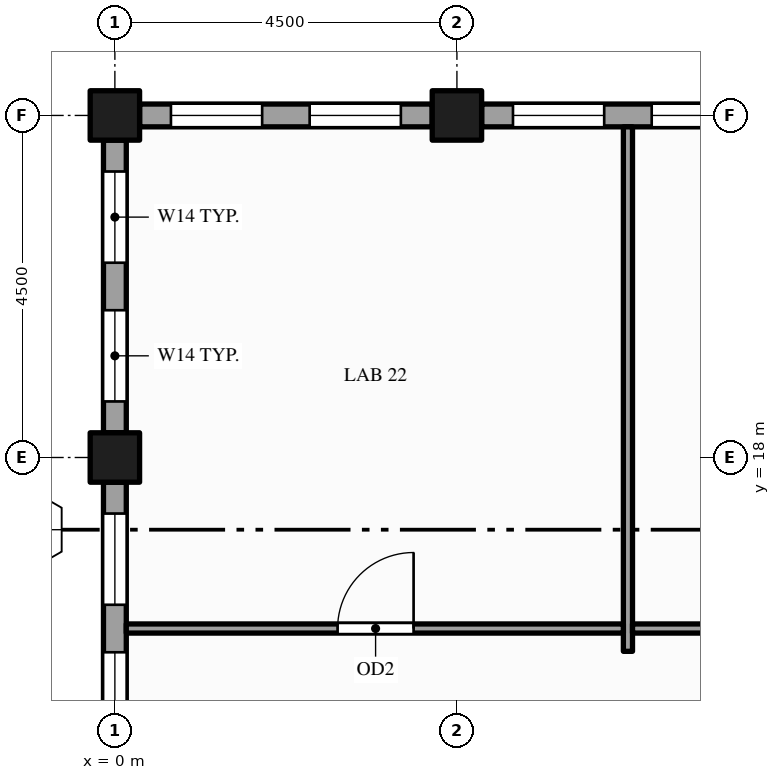
"""IFC4 building model, lengths in metres.
Left out: names, types, materials, properties, quantities, classifications, styles, units other than length and angle.
Written with IfcOpenShell. Run it as: python <this file> out.ifc"""

import sys

from ifc_helpers import new_model, si_unit, direction, frame, frame_2d, origin, origin_2d, place, context, subcontext, project, spatial, rectangle, hollow_rectangle, extrude, element, fill, save


model = new_model("IFC4")
c1 = context("Model", 3, precision=1e-05, world=origin(), true_north=direction((0.0, 1.0)))
c2 = subcontext(c1, "Body", "Model", "MODEL_VIEW")
j1 = project(units=[si_unit("LENGTHUNIT", "METRE"), si_unit("PLANEANGLEUNIT", "RADIAN")], contexts=[c1])
p1 = place(None, origin())
s1 = spatial("IfcSite", under=j1, at=p1, CompositionType="ELEMENT")
p2 = place(p1, origin())
s2 = spatial("IfcBuilding", under=s1, at=p2, CompositionType="ELEMENT")
p3 = place(p2, frame((0.0, 0.0, 285.0)))
s3 = spatial("IfcBuildingStorey", under=s2, at=p3, CompositionType="ELEMENT", Elevation=285.0)
for number, where, z_axis, x_axis in (
    (1, (0.0, 18.0, -0.15), (0.0, 0.0, 1.0), (1.0, 0.0, 0.0)),
    (2, (0.0, 22.5, -0.15), (0.0, 0.0, 1.0), (1.0, 0.0, 0.0)),
    (3, (4.5, 22.5, -0.15), (0.0, 0.0, 1.0), (1.0, 0.0, 0.0)),
):
    element("IfcColumn", number, at=place(p3, frame(where, z_axis=z_axis, x_axis=x_axis)), inside=s3, PredefinedType="COLUMN", context=c2, shape_type="SweptSolid", body=[
        extrude(hollow_rectangle(XDim=0.65, YDim=0.65, WallThickness=0.032, at=origin_2d()), origin(), (0.0, 0.0, 1.0), 4.0),
    ])
p4 = place(p3, frame((8.675, 22.5, 0.0), z_axis=(0.0, 0.0, 1.0), x_axis=(-1.0, 0.0, 0.0)))
e4 = element("IfcWall", 4, at=p4, inside=s3, PredefinedType="STANDARD", context=c2, shape_type="SweptSolid", body=[
    extrude(rectangle(XDim=3.85, YDim=0.3, at=frame_2d((1.925, 0.0))), origin(), (0.0, 0.0, 1.0), 2.87),
])
p5 = place(p4, frame((0.413, 0.0, 0.9)))
e5 = element("IfcOpeningElement", 5, at=p5, cuts=e4, PredefinedType="OPENING", context=c2, shape_type="SweptSolid", body=[
    extrude(rectangle(XDim=1.2, YDim=1.75, at=frame_2d((0.6, 0.875))), frame((0.0, 0.16, 0.0), z_axis=(0.0, -1.0, 0.0), x_axis=(1.0, 0.0, 0.0)), (0.0, 0.0, 1.0), 0.32),
])
p6 = place(p4, frame((2.238, 0.0, 0.9)))
e6 = element("IfcOpeningElement", 6, at=p6, cuts=e4, PredefinedType="OPENING", context=c2, shape_type="SweptSolid", body=[
    extrude(rectangle(XDim=1.2, YDim=1.75, at=frame_2d((0.6, 0.875))), frame((0.0, 0.16, 0.0), z_axis=(0.0, -1.0, 0.0), x_axis=(1.0, 0.0, 0.0)), (0.0, 0.0, 1.0), 0.32),
])
p7 = place(p3, frame((4.175, 22.5, 0.0), z_axis=(0.0, 0.0, 1.0), x_axis=(-1.0, 0.0, 0.0)))
e7 = element("IfcWall", 7, at=p7, inside=s3, PredefinedType="STANDARD", context=c2, shape_type="SweptSolid", body=[
    extrude(rectangle(XDim=3.85, YDim=0.3, at=frame_2d((1.925, 0.0))), origin(), (0.0, 0.0, 1.0), 2.87),
])
p8 = place(p7, frame((0.413, 0.0, 0.9)))
e8 = element("IfcOpeningElement", 8, at=p8, cuts=e7, PredefinedType="OPENING", context=c2, shape_type="SweptSolid", body=[
    extrude(rectangle(XDim=1.2, YDim=1.75, at=frame_2d((0.6, 0.875))), frame((0.0, 0.16, 0.0), z_axis=(0.0, -1.0, 0.0), x_axis=(1.0, 0.0, 0.0)), (0.0, 0.0, 1.0), 0.32),
])
p9 = place(p7, frame((2.238, 0.0, 0.9)))
e9 = element("IfcOpeningElement", 9, at=p9, cuts=e7, PredefinedType="OPENING", context=c2, shape_type="SweptSolid", body=[
    extrude(rectangle(XDim=1.2, YDim=1.75, at=frame_2d((0.6, 0.875))), frame((0.0, 0.16, 0.0), z_axis=(0.0, -1.0, 0.0), x_axis=(1.0, 0.0, 0.0)), (0.0, 0.0, 1.0), 0.32),
])
p10 = place(p3, frame((0.0, 22.175, 0.0), z_axis=(0.0, 0.0, 1.0), x_axis=(0.0, -1.0, 0.0)))
e10 = element("IfcWall", 10, at=p10, inside=s3, PredefinedType="STANDARD", context=c2, shape_type="SweptSolid", body=[
    extrude(rectangle(XDim=3.85, YDim=0.3, at=frame_2d((1.925, 0.0))), origin(), (0.0, 0.0, 1.0), 3.162),
])
p11 = place(p10, frame((0.413, 0.0, 0.9)))
e11 = element("IfcOpeningElement", 11, at=p11, cuts=e10, PredefinedType="OPENING", context=c2, shape_type="SweptSolid", body=[
    extrude(rectangle(XDim=1.2, YDim=2.0, at=frame_2d((0.6, 1.0))), frame((0.0, 0.16, 0.0), z_axis=(0.0, -1.0, 0.0), x_axis=(1.0, 0.0, 0.0)), (0.0, 0.0, 1.0), 0.32),
])
p12 = place(p10, frame((2.238, 0.0, 0.9)))
e12 = element("IfcOpeningElement", 12, at=p12, cuts=e10, PredefinedType="OPENING", context=c2, shape_type="SweptSolid", body=[
    extrude(rectangle(XDim=1.2, YDim=2.0, at=frame_2d((0.6, 1.0))), frame((0.0, 0.16, 0.0), z_axis=(0.0, -1.0, 0.0), x_axis=(1.0, 0.0, 0.0)), (0.0, 0.0, 1.0), 0.32),
])
p13 = place(p3, frame((0.0, 17.675, 0.0), z_axis=(0.0, 0.0, 1.0), x_axis=(0.0, -1.0, 0.0)))
e13 = element("IfcWall", 13, at=p13, inside=s3, PredefinedType="STANDARD", context=c2, shape_type="SweptSolid", body=[
    extrude(rectangle(XDim=3.85, YDim=0.3, at=frame_2d((1.925, 0.0))), origin(), (0.0, 0.0, 1.0), 3.162),
])
p14 = place(p13, frame((0.413, 0.0, 0.9)))
e14 = element("IfcOpeningElement", 14, at=p14, cuts=e13, PredefinedType="OPENING", context=c2, shape_type="SweptSolid", body=[
    extrude(rectangle(XDim=1.2, YDim=2.0, at=frame_2d((0.6, 1.0))), frame((0.0, 0.16, 0.0), z_axis=(0.0, -1.0, 0.0), x_axis=(1.0, 0.0, 0.0)), (0.0, 0.0, 1.0), 0.32),
])
p15 = place(p13, frame((2.238, 0.0, 0.9)))
e15 = element("IfcOpeningElement", 15, at=p15, cuts=e13, PredefinedType="OPENING", context=c2, shape_type="SweptSolid", body=[
    extrude(rectangle(XDim=1.2, YDim=2.0, at=frame_2d((0.6, 1.0))), frame((0.0, 0.16, 0.0), z_axis=(0.0, -1.0, 0.0), x_axis=(1.0, 0.0, 0.0)), (0.0, 0.0, 1.0), 0.32),
])
p16 = place(p3, frame((6.75, 15.45, 0.0), z_axis=(0.0, 0.0, 1.0), x_axis=(0.0, 1.0, 0.0)))
e16 = element("IfcWall", 16, at=p16, inside=s3, PredefinedType="PARTITIONING", context=c2, shape_type="SweptSolid", body=[
    extrude(rectangle(XDim=6.9, YDim=0.12, at=frame_2d((3.45, 0.0))), origin(), (0.0, 0.0, 1.0), 2.87),
])
p17 = place(p3, frame((0.15, 15.75, 0.0), z_axis=(0.0, 0.0, 1.0), x_axis=(1.0, 0.0, 0.0)))
e17 = element("IfcWall", 17, at=p17, inside=s3, PredefinedType="PARTITIONING", context=c2, shape_type="SweptSolid", body=[
    extrude(rectangle(XDim=6.54, YDim=0.12, at=frame_2d((3.27, 0.0))), origin(), (0.0, 0.0, 1.0), 2.87),
])
p18 = place(p17, frame((2.78, 0.0, 0.0)))
e18 = element("IfcOpeningElement", 18, at=p18, cuts=e17, PredefinedType="OPENING", context=c2, shape_type="SweptSolid", body=[
    extrude(rectangle(XDim=1.0, YDim=2.1, at=frame_2d((0.5, 1.05))), frame((0.0, 0.07, 0.0), z_axis=(0.0, -1.0, 0.0), x_axis=(1.0, 0.0, 0.0)), (0.0, 0.0, 1.0), 0.14),
])
p19 = place(p3, frame((6.81, 15.75, 0.0), z_axis=(0.0, 0.0, 1.0), x_axis=(1.0, 0.0, 0.0)))
e19 = element("IfcWall", 19, at=p19, inside=s3, PredefinedType="PARTITIONING", context=c2, shape_type="SweptSolid", body=[
    extrude(rectangle(XDim=6.63, YDim=0.12, at=frame_2d((3.315, 0.0))), origin(), (0.0, 0.0, 1.0), 2.87),
])
p20 = place(p19, frame((2.815, 0.0, 0.0)))
e20 = element("IfcOpeningElement", 20, at=p20, cuts=e19, PredefinedType="OPENING", context=c2, shape_type="SweptSolid", body=[
    extrude(rectangle(XDim=1.0, YDim=2.1, at=frame_2d((0.5, 1.05))), frame((0.0, 0.07, 0.0), z_axis=(0.0, -1.0, 0.0), x_axis=(1.0, 0.0, 0.0)), (0.0, 0.0, 1.0), 0.14),
])
p21 = place(p5, origin())
e21 = element("IfcWindow", 21, at=p21, inside=s3, PartitioningType="SINGLE_PANEL", PredefinedType="WINDOW", context=c2, shape_type="SweptSolid", body=[
    extrude(rectangle(XDim=1.2, YDim=1.75, at=frame_2d((0.6, 0.875))), frame((0.0, 0.03, 0.0), z_axis=(0.0, -1.0, 0.0), x_axis=(1.0, 0.0, 0.0)), (0.0, 0.0, 1.0), 0.06),
])
fill(e5, e21)
p22 = place(p6, origin())
e22 = element("IfcWindow", 22, at=p22, inside=s3, PartitioningType="SINGLE_PANEL", PredefinedType="WINDOW", context=c2, shape_type="SweptSolid", body=[
    extrude(rectangle(XDim=1.2, YDim=1.75, at=frame_2d((0.6, 0.875))), frame((0.0, 0.03, 0.0), z_axis=(0.0, -1.0, 0.0), x_axis=(1.0, 0.0, 0.0)), (0.0, 0.0, 1.0), 0.06),
])
fill(e6, e22)
p23 = place(p8, origin())
e23 = element("IfcWindow", 23, at=p23, inside=s3, PartitioningType="SINGLE_PANEL", PredefinedType="WINDOW", context=c2, shape_type="SweptSolid", body=[
    extrude(rectangle(XDim=1.2, YDim=1.75, at=frame_2d((0.6, 0.875))), frame((0.0, 0.03, 0.0), z_axis=(0.0, -1.0, 0.0), x_axis=(1.0, 0.0, 0.0)), (0.0, 0.0, 1.0), 0.06),
])
fill(e8, e23)
p24 = place(p9, origin())
e24 = element("IfcWindow", 24, at=p24, inside=s3, PartitioningType="SINGLE_PANEL", PredefinedType="WINDOW", context=c2, shape_type="SweptSolid", body=[
    extrude(rectangle(XDim=1.2, YDim=1.75, at=frame_2d((0.6, 0.875))), frame((0.0, 0.03, 0.0), z_axis=(0.0, -1.0, 0.0), x_axis=(1.0, 0.0, 0.0)), (0.0, 0.0, 1.0), 0.06),
])
fill(e9, e24)
p25 = place(p11, origin())
e25 = element("IfcWindow", 25, at=p25, inside=s3, PartitioningType="SINGLE_PANEL", PredefinedType="WINDOW", context=c2, shape_type="SweptSolid", body=[
    extrude(rectangle(XDim=1.2, YDim=2.0, at=frame_2d((0.6, 1.0))), frame((0.0, 0.03, 0.0), z_axis=(0.0, -1.0, 0.0), x_axis=(1.0, 0.0, 0.0)), (0.0, 0.0, 1.0), 0.06),
])
fill(e11, e25)
p26 = place(p12, origin())
e26 = element("IfcWindow", 26, at=p26, inside=s3, PartitioningType="SINGLE_PANEL", PredefinedType="WINDOW", context=c2, shape_type="SweptSolid", body=[
    extrude(rectangle(XDim=1.2, YDim=2.0, at=frame_2d((0.6, 1.0))), frame((0.0, 0.03, 0.0), z_axis=(0.0, -1.0, 0.0), x_axis=(1.0, 0.0, 0.0)), (0.0, 0.0, 1.0), 0.06),
])
fill(e12, e26)
p27 = place(p14, origin())
e27 = element("IfcWindow", 27, at=p27, inside=s3, PartitioningType="SINGLE_PANEL", PredefinedType="WINDOW", context=c2, shape_type="SweptSolid", body=[
    extrude(rectangle(XDim=1.2, YDim=2.0, at=frame_2d((0.6, 1.0))), frame((0.0, 0.03, 0.0), z_axis=(0.0, -1.0, 0.0), x_axis=(1.0, 0.0, 0.0)), (0.0, 0.0, 1.0), 0.06),
])
fill(e14, e27)
p28 = place(p15, origin())
e28 = element("IfcWindow", 28, at=p28, inside=s3, PartitioningType="SINGLE_PANEL", PredefinedType="WINDOW", context=c2, shape_type="SweptSolid", body=[
    extrude(rectangle(XDim=1.2, YDim=2.0, at=frame_2d((0.6, 1.0))), frame((0.0, 0.03, 0.0), z_axis=(0.0, -1.0, 0.0), x_axis=(1.0, 0.0, 0.0)), (0.0, 0.0, 1.0), 0.06),
])
fill(e15, e28)
p29 = place(p18, origin())
e29 = element("IfcDoor", 29, at=p29, inside=s3, OperationType="SINGLE_SWING_RIGHT", PredefinedType="DOOR", context=c2, shape_type="SweptSolid", body=[
    extrude(rectangle(XDim=1.0, YDim=2.1, at=frame_2d((0.5, 1.05))), frame((0.0, 0.025, 0.0), z_axis=(0.0, -1.0, 0.0), x_axis=(1.0, 0.0, 0.0)), (0.0, 0.0, 1.0), 0.05),
])
fill(e18, e29)
save(model, sys.argv[1])
